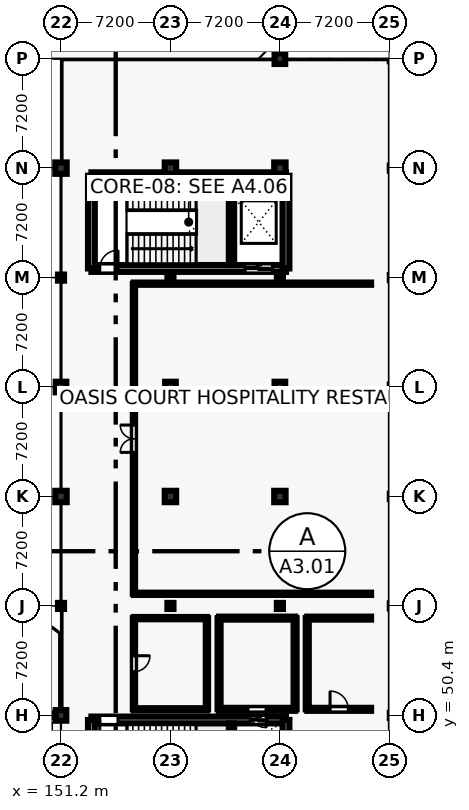
"""IFC4 building model, lengths in metres.
Left out: names, types, materials, properties, quantities, classifications, styles, units other than length and angle.
Written with IfcOpenShell. Run it as: python <this file> out.ifc"""

import sys

from ifc_helpers import new_model, si_unit, direction, frame, frame_2d, origin, origin_2d, place, context, subcontext, project, spatial, rectangle, hollow_rectangle, extrude, element, fill, save


model = new_model("IFC4")
c1 = context("Model", 3, precision=1e-05, world=origin(), true_north=direction((0.0, 1.0)))
c2 = subcontext(c1, "Body", "Model", "MODEL_VIEW")
j1 = project(units=[si_unit("LENGTHUNIT", "METRE"), si_unit("PLANEANGLEUNIT", "RADIAN")], contexts=[c1])
p1 = place(None, origin())
s1 = spatial("IfcSite", under=j1, at=p1, CompositionType="ELEMENT")
p2 = place(p1, origin())
s2 = spatial("IfcBuilding", under=s1, at=p2, CompositionType="ELEMENT")
p3 = place(p2, frame((0.0, 0.0, 9.6)))
s3 = spatial("IfcBuildingStorey", under=s2, at=p3, CompositionType="ELEMENT", Elevation=9.6)
p4 = place(p3, frame((151.2, 50.4, 0.0), z_axis=(0.0, 0.0, 1.0), x_axis=(1.0, 0.0, 0.0)))
e1 = element("IfcColumn", 1, at=p4, inside=s3, PredefinedType="COLUMN", context=c2, shape_type="SweptSolid", body=[
    extrude(rectangle(XDim=0.7, YDim=0.7, at=origin_2d()), origin(), (0.0, 0.0, 1.0), 4.2),
])
p5 = place(p3, frame((151.2, 57.6, 0.0), z_axis=(0.0, 0.0, 1.0), x_axis=(1.0, 0.0, 0.0)))
e2 = element("IfcColumn", 2, at=p5, inside=s3, PredefinedType="COLUMN", context=c2, shape_type="SweptSolid", body=[
    extrude(hollow_rectangle(XDim=0.4, YDim=0.4, WallThickness=0.02, at=origin_2d()), origin(), (0.0, 0.0, 1.0), 4.2),
])
p6 = place(p3, frame((151.2, 64.8, 0.0), z_axis=(0.0, 0.0, 1.0), x_axis=(1.0, 0.0, 0.0)))
e3 = element("IfcColumn", 3, at=p6, inside=s3, PredefinedType="COLUMN", context=c2, shape_type="SweptSolid", body=[
    extrude(rectangle(XDim=0.75, YDim=0.75, at=origin_2d()), origin(), (0.0, 0.0, 1.0), 4.2),
])
p7 = place(p3, frame((151.2, 72.0, 0.0), z_axis=(0.0, 0.0, 1.0), x_axis=(1.0, 0.0, 0.0)))
e4 = element("IfcColumn", 4, at=p7, inside=s3, PredefinedType="COLUMN", context=c2, shape_type="SweptSolid", body=[
    extrude(rectangle(XDim=0.7, YDim=0.7, at=origin_2d()), origin(), (0.0, 0.0, 1.0), 4.2),
])
p8 = place(p3, frame((151.2, 79.2, 0.0), z_axis=(0.0, 0.0, 1.0), x_axis=(1.0, 0.0, 0.0)))
e5 = element("IfcColumn", 5, at=p8, inside=s3, PredefinedType="COLUMN", context=c2, shape_type="SweptSolid", body=[
    extrude(hollow_rectangle(XDim=0.4, YDim=0.4, WallThickness=0.02, at=origin_2d()), origin(), (0.0, 0.0, 1.0), 4.2),
])
p9 = place(p3, frame((151.2, 86.4, 0.0), z_axis=(0.0, 0.0, 1.0), x_axis=(1.0, 0.0, 0.0)))
e6 = element("IfcColumn", 6, at=p9, inside=s3, PredefinedType="COLUMN", context=c2, shape_type="SweptSolid", body=[
    extrude(rectangle(XDim=0.75, YDim=0.75, at=origin_2d()), origin(), (0.0, 0.0, 1.0), 4.2),
])
p10 = place(p3, frame((158.4, 57.6, 0.0), z_axis=(0.0, 0.0, 1.0), x_axis=(1.0, 0.0, 0.0)))
e7 = element("IfcColumn", 7, at=p10, inside=s3, PredefinedType="COLUMN", context=c2, shape_type="SweptSolid", body=[
    extrude(hollow_rectangle(XDim=0.4, YDim=0.4, WallThickness=0.02, at=origin_2d()), origin(), (0.0, 0.0, 1.0), 4.2),
])
p11 = place(p3, frame((158.4, 64.8, 0.0), z_axis=(0.0, 0.0, 1.0), x_axis=(1.0, 0.0, 0.0)))
e8 = element("IfcColumn", 8, at=p11, inside=s3, PredefinedType="COLUMN", context=c2, shape_type="SweptSolid", body=[
    extrude(rectangle(XDim=0.75, YDim=0.75, at=origin_2d()), origin(), (0.0, 0.0, 1.0), 4.2),
])
p12 = place(p3, frame((158.4, 72.0, 0.0), z_axis=(0.0, 0.0, 1.0), x_axis=(1.0, 0.0, 0.0)))
e9 = element("IfcColumn", 9, at=p12, inside=s3, PredefinedType="COLUMN", context=c2, shape_type="SweptSolid", body=[
    extrude(rectangle(XDim=0.7, YDim=0.7, at=origin_2d()), origin(), (0.0, 0.0, 1.0), 4.2),
])
p13 = place(p3, frame((158.4, 79.2, 0.0), z_axis=(0.0, 0.0, 1.0), x_axis=(1.0, 0.0, 0.0)))
e10 = element("IfcColumn", 10, at=p13, inside=s3, PredefinedType="COLUMN", context=c2, shape_type="SweptSolid", body=[
    extrude(hollow_rectangle(XDim=0.4, YDim=0.4, WallThickness=0.02, at=origin_2d()), origin(), (0.0, 0.0, 1.0), 4.2),
])
p14 = place(p3, frame((158.4, 86.4, 0.0), z_axis=(0.0, 0.0, 1.0), x_axis=(1.0, 0.0, 0.0)))
e11 = element("IfcColumn", 11, at=p14, inside=s3, PredefinedType="COLUMN", context=c2, shape_type="SweptSolid", body=[
    extrude(rectangle(XDim=0.75, YDim=0.75, at=origin_2d()), origin(), (0.0, 0.0, 1.0), 4.2),
])
p15 = place(p3, frame((165.6, 57.6, 0.0), z_axis=(0.0, 0.0, 1.0), x_axis=(1.0, 0.0, 0.0)))
e12 = element("IfcColumn", 12, at=p15, inside=s3, PredefinedType="COLUMN", context=c2, shape_type="SweptSolid", body=[
    extrude(hollow_rectangle(XDim=0.4, YDim=0.4, WallThickness=0.02, at=origin_2d()), origin(), (0.0, 0.0, 1.0), 4.2),
])
p16 = place(p3, frame((165.6, 64.8, 0.0), z_axis=(0.0, 0.0, 1.0), x_axis=(1.0, 0.0, 0.0)))
e13 = element("IfcColumn", 13, at=p16, inside=s3, PredefinedType="COLUMN", context=c2, shape_type="SweptSolid", body=[
    extrude(rectangle(XDim=0.75, YDim=0.75, at=origin_2d()), origin(), (0.0, 0.0, 1.0), 4.2),
])
p17 = place(p3, frame((165.6, 72.0, 0.0), z_axis=(0.0, 0.0, 1.0), x_axis=(1.0, 0.0, 0.0)))
e14 = element("IfcColumn", 14, at=p17, inside=s3, PredefinedType="COLUMN", context=c2, shape_type="SweptSolid", body=[
    extrude(rectangle(XDim=0.7, YDim=0.7, at=origin_2d()), origin(), (0.0, 0.0, 1.0), 4.2),
])
p18 = place(p3, frame((165.6, 79.2, 0.0), z_axis=(0.0, 0.0, 1.0), x_axis=(1.0, 0.0, 0.0)))
e15 = element("IfcColumn", 15, at=p18, inside=s3, PredefinedType="COLUMN", context=c2, shape_type="SweptSolid", body=[
    extrude(hollow_rectangle(XDim=0.4, YDim=0.4, WallThickness=0.02, at=origin_2d()), origin(), (0.0, 0.0, 1.0), 4.2),
])
p19 = place(p3, frame((165.6, 86.4, 0.0), z_axis=(0.0, 0.0, 1.0), x_axis=(1.0, 0.0, 0.0)))
e16 = element("IfcColumn", 16, at=p19, inside=s3, PredefinedType="COLUMN", context=c2, shape_type="SweptSolid", body=[
    extrude(rectangle(XDim=0.75, YDim=0.75, at=origin_2d()), origin(), (0.0, 0.0, 1.0), 4.2),
])
p20 = place(p3, frame((165.6, 93.6, 0.0), z_axis=(0.0, 0.0, 1.0), x_axis=(1.0, 0.0, 0.0)))
e17 = element("IfcColumn", 17, at=p20, inside=s3, PredefinedType="COLUMN", context=c2, shape_type="SweptSolid", body=[
    extrude(rectangle(XDim=0.7, YDim=0.7, at=origin_2d()), origin(), (0.0, 0.0, 1.0), 4.2),
])
p21 = place(p3, frame((153.2, 50.1, 0.0), z_axis=(0.0, 0.0, 1.0), x_axis=(1.0, 0.0, 0.0)))
e18 = element("IfcWall", 18, at=p21, inside=s3, PredefinedType="SHEAR", context=c2, shape_type="SweptSolid", body=[
    extrude(rectangle(XDim=12.8, YDim=0.45, at=frame_2d((6.4, 0.0))), origin(), (0.0, 0.0, 1.0), 3.88),
])
p22 = place(p21, frame((0.55, 0.0, 0.0)))
e19 = element("IfcOpeningElement", 19, at=p22, cuts=e18, PredefinedType="OPENING", context=c2, shape_type="SweptSolid", body=[
    extrude(rectangle(XDim=1.2, YDim=2.25, at=frame_2d((0.6, 1.125))), frame((0.0, 0.235, 0.0), z_axis=(0.0, -1.0, 0.0), x_axis=(1.0, 0.0, 0.0)), (0.0, 0.0, 1.0), 0.47),
])
p23 = place(p21, frame((10.458, 0.0, 0.0)))
e20 = element("IfcOpeningElement", 20, at=p23, cuts=e18, PredefinedType="OPENING", context=c2, shape_type="SweptSolid", body=[
    extrude(rectangle(XDim=1.1, YDim=2.2, at=frame_2d((0.55, 1.1))), frame((0.0, 0.235, 0.0), z_axis=(0.0, -1.0, 0.0), x_axis=(1.0, 0.0, 0.0)), (0.0, 0.0, 1.0), 0.47),
])
for number, where, z_axis, x_axis in (
    (21, (153.2, 44.0, 0.0), (0.0, 0.0, 1.0), (0.0, 1.0, 0.0)),
    (22, (166.0, 44.0, 0.0), (0.0, 0.0, 1.0), (0.0, 1.0, 0.0)),
):
    element("IfcWall", number, at=place(p3, frame(where, z_axis=z_axis, x_axis=x_axis)), inside=s3, PredefinedType="SHEAR", context=c2, shape_type="SweptSolid", body=[
        extrude(rectangle(XDim=6.1, YDim=0.45, at=frame_2d((3.05, 0.0))), origin(), (0.0, 0.0, 1.0), 3.88),
    ])
p24 = place(p3, frame((162.416, 44.225, 0.0), z_axis=(0.0, 0.0, 1.0), x_axis=(0.0, 1.0, 0.0)))
e23 = element("IfcWall", 23, at=p24, inside=s3, PredefinedType="SHEAR", context=c2, shape_type="SweptSolid", body=[
    extrude(rectangle(XDim=5.65, YDim=0.35, at=frame_2d((2.825, 0.0))), origin(), (0.0, 0.0, 1.0), 3.88),
])
p25 = place(p3, frame((153.2, 79.8, 0.0), z_axis=(0.0, 0.0, 1.0), x_axis=(1.0, 0.0, 0.0)))
e24 = element("IfcWall", 24, at=p25, inside=s3, PredefinedType="SHEAR", context=c2, shape_type="SweptSolid", body=[
    extrude(rectangle(XDim=12.8, YDim=0.45, at=frame_2d((6.4, 0.0))), origin(), (0.0, 0.0, 1.0), 3.88),
])
p26 = place(p25, frame((0.55, 0.0, 0.0)))
e25 = element("IfcOpeningElement", 25, at=p26, cuts=e24, PredefinedType="OPENING", context=c2, shape_type="SweptSolid", body=[
    extrude(rectangle(XDim=1.2, YDim=2.25, at=frame_2d((0.6, 1.125))), frame((0.0, 0.235, 0.0), z_axis=(0.0, -1.0, 0.0), x_axis=(1.0, 0.0, 0.0)), (0.0, 0.0, 1.0), 0.47),
])
p27 = place(p25, frame((10.108, 0.0, 0.0)))
e26 = element("IfcOpeningElement", 26, at=p27, cuts=e24, PredefinedType="OPENING", context=c2, shape_type="SweptSolid", body=[
    extrude(rectangle(XDim=1.8, YDim=2.4, at=frame_2d((0.9, 1.2))), frame((0.0, 0.235, 0.0), z_axis=(0.0, -1.0, 0.0), x_axis=(1.0, 0.0, 0.0)), (0.0, 0.0, 1.0), 0.47),
])
p28 = place(p3, frame((153.2, 85.9, 0.0), z_axis=(0.0, 0.0, 1.0), x_axis=(1.0, 0.0, 0.0)))
e27 = element("IfcWall", 27, at=p28, inside=s3, PredefinedType="SHEAR", context=c2, shape_type="SweptSolid", body=[
    extrude(rectangle(XDim=12.8, YDim=0.45, at=frame_2d((6.4, 0.0))), origin(), (0.0, 0.0, 1.0), 3.88),
])
for number, where, z_axis, x_axis in (
    (28, (153.2, 79.8, 0.0), (0.0, 0.0, 1.0), (0.0, 1.0, 0.0)),
    (29, (166.0, 79.8, 0.0), (0.0, 0.0, 1.0), (0.0, 1.0, 0.0)),
):
    element("IfcWall", number, at=place(p3, frame(where, z_axis=z_axis, x_axis=x_axis)), inside=s3, PredefinedType="SHEAR", context=c2, shape_type="SweptSolid", body=[
        extrude(rectangle(XDim=6.1, YDim=0.45, at=frame_2d((3.05, 0.0))), origin(), (0.0, 0.0, 1.0), 3.88),
    ])
p29 = place(p3, frame((162.416, 80.025, 0.0), z_axis=(0.0, 0.0, 1.0), x_axis=(0.0, 1.0, 0.0)))
e30 = element("IfcWall", 30, at=p29, inside=s3, PredefinedType="SHEAR", context=c2, shape_type="SweptSolid", body=[
    extrude(rectangle(XDim=5.65, YDim=0.35, at=frame_2d((2.825, 0.0))), origin(), (0.0, 0.0, 1.0), 3.88),
])
p30 = place(p3, frame((144.35, 50.4, 0.0), z_axis=(0.0, 0.0, 1.0), x_axis=(1.0, 0.0, 0.0)))
e31 = element("IfcWall", 31, at=p30, inside=s3, PredefinedType="SOLIDWALL", context=c2, shape_type="SweptSolid", body=[
    extrude(rectangle(XDim=6.5, YDim=0.26, at=frame_2d((3.25, 0.0))), origin(), (0.0, 0.0, 1.0), 2.94),
])
p31 = place(p30, frame((2.35, 0.0, 0.0)))
e32 = element("IfcOpeningElement", 32, at=p31, cuts=e31, PredefinedType="OPENING", context=c2, shape_type="SweptSolid", body=[
    extrude(rectangle(XDim=1.8, YDim=2.35, at=frame_2d((0.9, 1.175))), frame((0.0, 0.14, 0.0), z_axis=(0.0, -1.0, 0.0), x_axis=(1.0, 0.0, 0.0)), (0.0, 0.0, 1.0), 0.28),
])
p32 = place(p3, frame((165.45, 93.6, 1.8), z_axis=(0.0, 0.0, 1.0), x_axis=(0.0, 1.0, 0.0)))
e33 = element("IfcWall", 33, at=p32, inside=s3, PredefinedType="PARAPET", context=c2, shape_type="SweptSolid", body=[
    extrude(rectangle(XDim=28.65, YDim=0.18, at=frame_2d((14.325, 0.0))), origin(), (0.0, 0.0, 1.0), 1.15),
])
for number, where, z_axis, x_axis in (
    (34, (156.0, 58.4, 0.0), (0.0, 0.0, 1.0), (1.0, 0.0, 0.0)),
    (35, (171.6, 78.8, 0.0), (0.0, 0.0, 1.0), (-1.0, 0.0, 0.0)),
):
    element("IfcWall", number, at=place(p3, frame(where, z_axis=z_axis, x_axis=x_axis)), inside=s3, PredefinedType="PARTITIONING", context=c2, shape_type="SweptSolid", body=[
        extrude(rectangle(XDim=15.6, YDim=0.15, at=frame_2d((7.8, 0.0))), origin(), (0.0, 0.0, 1.0), 2.94),
    ])
p33 = place(p3, frame((156.0, 78.8, 0.0), z_axis=(0.0, 0.0, 1.0), x_axis=(0.0, -1.0, 0.0)))
e36 = element("IfcWall", 36, at=p33, inside=s3, PredefinedType="PARTITIONING", context=c2, shape_type="SweptSolid", body=[
    extrude(rectangle(XDim=20.4, YDim=0.15, at=frame_2d((10.2, 0.0))), origin(), (0.0, 0.0, 1.0), 2.94),
])
p34 = place(p33, frame((9.3, 0.0, 0.0)))
e37 = element("IfcOpeningElement", 37, at=p34, cuts=e36, PredefinedType="OPENING", context=c2, shape_type="SweptSolid", body=[
    extrude(rectangle(XDim=1.8, YDim=2.3, at=frame_2d((0.9, 1.15))), frame((0.0, 0.085, 0.0), z_axis=(0.0, -1.0, 0.0), x_axis=(1.0, 0.0, 0.0)), (0.0, 0.0, 1.0), 0.17),
])
p35 = place(p3, frame((156.0, 50.8, 0.0), z_axis=(0.0, 0.0, 1.0), x_axis=(1.0, 0.0, 0.0)))
e38 = element("IfcWall", 38, at=p35, inside=s3, PredefinedType="PARTITIONING", context=c2, shape_type="SweptSolid", body=[
    extrude(rectangle(XDim=4.8, YDim=0.15, at=frame_2d((2.4, 0.0))), origin(), (0.0, 0.0, 1.0), 2.94),
])
p36 = place(p3, frame((160.8, 50.8, 0.0), z_axis=(0.0, 0.0, 1.0), x_axis=(0.0, 1.0, 0.0)))
e39 = element("IfcWall", 39, at=p36, inside=s3, PredefinedType="PARTITIONING", context=c2, shape_type="SweptSolid", body=[
    extrude(rectangle(XDim=6.0, YDim=0.15, at=frame_2d((3.0, 0.0))), origin(), (0.0, 0.0, 1.0), 2.94),
])
p37 = place(p3, frame((160.8, 56.8, 0.0), z_axis=(0.0, 0.0, 1.0), x_axis=(-1.0, 0.0, 0.0)))
e40 = element("IfcWall", 40, at=p37, inside=s3, PredefinedType="PARTITIONING", context=c2, shape_type="SweptSolid", body=[
    extrude(rectangle(XDim=4.8, YDim=0.15, at=frame_2d((2.4, 0.0))), origin(), (0.0, 0.0, 1.0), 2.94),
])
p38 = place(p3, frame((156.0, 56.8, 0.0), z_axis=(0.0, 0.0, 1.0), x_axis=(0.0, -1.0, 0.0)))
e41 = element("IfcWall", 41, at=p38, inside=s3, PredefinedType="PARTITIONING", context=c2, shape_type="SweptSolid", body=[
    extrude(rectangle(XDim=6.0, YDim=0.15, at=frame_2d((3.0, 0.0))), origin(), (0.0, 0.0, 1.0), 2.94),
])
p39 = place(p38, frame((2.475, 0.0, 0.0)))
e42 = element("IfcOpeningElement", 42, at=p39, cuts=e41, PredefinedType="OPENING", context=c2, shape_type="SweptSolid", body=[
    extrude(rectangle(XDim=1.05, YDim=2.2, at=frame_2d((0.525, 1.1))), frame((0.0, 0.085, 0.0), z_axis=(0.0, -1.0, 0.0), x_axis=(1.0, 0.0, 0.0)), (0.0, 0.0, 1.0), 0.17),
])
p40 = place(p3, frame((161.6, 50.8, 0.0), z_axis=(0.0, 0.0, 1.0), x_axis=(1.0, 0.0, 0.0)))
e43 = element("IfcWall", 43, at=p40, inside=s3, PredefinedType="PARTITIONING", context=c2, shape_type="SweptSolid", body=[
    extrude(rectangle(XDim=5.0, YDim=0.2, at=frame_2d((2.5, 0.0))), origin(), (0.0, 0.0, 1.0), 2.94),
])
p41 = place(p40, frame((1.9, 0.0, 0.0)))
e44 = element("IfcOpeningElement", 44, at=p41, cuts=e43, PredefinedType="OPENING", context=c2, shape_type="SweptSolid", body=[
    extrude(rectangle(XDim=1.2, YDim=2.25, at=frame_2d((0.6, 1.125))), frame((0.0, 0.11, 0.0), z_axis=(0.0, -1.0, 0.0), x_axis=(1.0, 0.0, 0.0)), (0.0, 0.0, 1.0), 0.22),
])
p42 = place(p3, frame((166.6, 50.8, 0.0), z_axis=(0.0, 0.0, 1.0), x_axis=(0.0, 1.0, 0.0)))
e45 = element("IfcWall", 45, at=p42, inside=s3, PredefinedType="PARTITIONING", context=c2, shape_type="SweptSolid", body=[
    extrude(rectangle(XDim=6.0, YDim=0.2, at=frame_2d((3.0, 0.0))), origin(), (0.0, 0.0, 1.0), 2.94),
])
p43 = place(p3, frame((166.6, 56.8, 0.0), z_axis=(0.0, 0.0, 1.0), x_axis=(-1.0, 0.0, 0.0)))
e46 = element("IfcWall", 46, at=p43, inside=s3, PredefinedType="PARTITIONING", context=c2, shape_type="SweptSolid", body=[
    extrude(rectangle(XDim=5.0, YDim=0.2, at=frame_2d((2.5, 0.0))), origin(), (0.0, 0.0, 1.0), 2.94),
])
p44 = place(p3, frame((161.6, 56.8, 0.0), z_axis=(0.0, 0.0, 1.0), x_axis=(0.0, -1.0, 0.0)))
e47 = element("IfcWall", 47, at=p44, inside=s3, PredefinedType="PARTITIONING", context=c2, shape_type="SweptSolid", body=[
    extrude(rectangle(XDim=6.0, YDim=0.2, at=frame_2d((3.0, 0.0))), origin(), (0.0, 0.0, 1.0), 2.94),
])
p45 = place(p3, frame((167.4, 50.8, 0.0), z_axis=(0.0, 0.0, 1.0), x_axis=(1.0, 0.0, 0.0)))
e48 = element("IfcWall", 48, at=p45, inside=s3, PredefinedType="PARTITIONING", context=c2, shape_type="SweptSolid", body=[
    extrude(rectangle(XDim=4.2, YDim=0.2, at=frame_2d((2.1, 0.0))), origin(), (0.0, 0.0, 1.0), 2.94),
])
p46 = place(p45, frame((1.5, 0.0, 0.0)))
e49 = element("IfcOpeningElement", 49, at=p46, cuts=e48, PredefinedType="OPENING", context=c2, shape_type="SweptSolid", body=[
    extrude(rectangle(XDim=1.2, YDim=2.25, at=frame_2d((0.6, 1.125))), frame((0.0, 0.11, 0.0), z_axis=(0.0, -1.0, 0.0), x_axis=(1.0, 0.0, 0.0)), (0.0, 0.0, 1.0), 0.22),
])
p47 = place(p3, frame((171.6, 56.8, 0.0), z_axis=(0.0, 0.0, 1.0), x_axis=(-1.0, 0.0, 0.0)))
e50 = element("IfcWall", 50, at=p47, inside=s3, PredefinedType="PARTITIONING", context=c2, shape_type="SweptSolid", body=[
    extrude(rectangle(XDim=4.2, YDim=0.2, at=frame_2d((2.1, 0.0))), origin(), (0.0, 0.0, 1.0), 2.94),
])
p48 = place(p3, frame((167.4, 56.8, 0.0), z_axis=(0.0, 0.0, 1.0), x_axis=(0.0, -1.0, 0.0)))
e51 = element("IfcWall", 51, at=p48, inside=s3, PredefinedType="PARTITIONING", context=c2, shape_type="SweptSolid", body=[
    extrude(rectangle(XDim=6.0, YDim=0.2, at=frame_2d((3.0, 0.0))), origin(), (0.0, 0.0, 1.0), 2.94),
])
p49 = place(p22, frame((1.2, 0.0, 0.0), z_axis=(0.0, 0.0, 1.0), x_axis=(-1.0, 0.0, 0.0)))
e52 = element("IfcDoor", 52, at=p49, inside=s3, OperationType="SINGLE_SWING_LEFT", PredefinedType="DOOR", context=c2, shape_type="SweptSolid", body=[
    extrude(rectangle(XDim=1.2, YDim=2.25, at=frame_2d((0.6, 1.125))), frame((0.0, 0.025, 0.0), z_axis=(0.0, -1.0, 0.0), x_axis=(1.0, 0.0, 0.0)), (0.0, 0.0, 1.0), 0.05),
])
fill(e19, e52)
p50 = place(p23, origin())
e53 = element("IfcDoor", 53, at=p50, inside=s3, OperationType="SLIDING_TO_RIGHT", PredefinedType="DOOR", context=c2, shape_type="SweptSolid", body=[
    extrude(rectangle(XDim=1.1, YDim=2.2, at=frame_2d((0.55, 1.1))), frame((0.0, 0.025, 0.0), z_axis=(0.0, -1.0, 0.0), x_axis=(1.0, 0.0, 0.0)), (0.0, 0.0, 1.0), 0.05),
])
fill(e20, e53)
p51 = place(p26, origin())
e54 = element("IfcDoor", 54, at=p51, inside=s3, OperationType="SINGLE_SWING_RIGHT", PredefinedType="DOOR", context=c2, shape_type="SweptSolid", body=[
    extrude(rectangle(XDim=1.2, YDim=2.25, at=frame_2d((0.6, 1.125))), frame((0.0, 0.025, 0.0), z_axis=(0.0, -1.0, 0.0), x_axis=(1.0, 0.0, 0.0)), (0.0, 0.0, 1.0), 0.05),
])
fill(e25, e54)
p52 = place(p27, origin())
e55 = element("IfcDoor", 55, at=p52, inside=s3, OperationType="SLIDING_TO_RIGHT", PredefinedType="DOOR", context=c2, shape_type="SweptSolid", body=[
    extrude(rectangle(XDim=1.8, YDim=2.4, at=frame_2d((0.9, 1.2))), frame((0.0, 0.025, 0.0), z_axis=(0.0, -1.0, 0.0), x_axis=(1.0, 0.0, 0.0)), (0.0, 0.0, 1.0), 0.05),
])
fill(e26, e55)
p53 = place(p34, frame((1.8, 0.0, 0.0), z_axis=(0.0, 0.0, 1.0), x_axis=(-1.0, 0.0, 0.0)))
e56 = element("IfcDoor", 56, at=p53, inside=s3, OperationType="DOUBLE_DOOR_SINGLE_SWING", PredefinedType="DOOR", context=c2, shape_type="SweptSolid", body=[
    extrude(rectangle(XDim=1.8, YDim=2.3, at=frame_2d((0.9, 1.15))), frame((0.0, 0.025, 0.0), z_axis=(0.0, -1.0, 0.0), x_axis=(1.0, 0.0, 0.0)), (0.0, 0.0, 1.0), 0.05),
])
fill(e37, e56)
p54 = place(p39, origin())
e57 = element("IfcDoor", 57, at=p54, inside=s3, OperationType="SINGLE_SWING_LEFT", PredefinedType="DOOR", context=c2, shape_type="SweptSolid", body=[
    extrude(rectangle(XDim=1.05, YDim=2.2, at=frame_2d((0.525, 1.1))), frame((0.0, 0.025, 0.0), z_axis=(0.0, -1.0, 0.0), x_axis=(1.0, 0.0, 0.0)), (0.0, 0.0, 1.0), 0.05),
])
fill(e42, e57)
p55 = place(p41, frame((1.2, 0.0, 0.0), z_axis=(0.0, 0.0, 1.0), x_axis=(-1.0, 0.0, 0.0)))
e58 = element("IfcDoor", 58, at=p55, inside=s3, OperationType="SINGLE_SWING_RIGHT", PredefinedType="DOOR", context=c2, shape_type="SweptSolid", body=[
    extrude(rectangle(XDim=1.2, YDim=2.25, at=frame_2d((0.6, 1.125))), frame((0.0, 0.025, 0.0), z_axis=(0.0, -1.0, 0.0), x_axis=(1.0, 0.0, 0.0)), (0.0, 0.0, 1.0), 0.05),
])
fill(e44, e58)
p56 = place(p46, origin())
e59 = element("IfcDoor", 59, at=p56, inside=s3, OperationType="SINGLE_SWING_LEFT", PredefinedType="DOOR", context=c2, shape_type="SweptSolid", body=[
    extrude(rectangle(XDim=1.2, YDim=2.25, at=frame_2d((0.6, 1.125))), frame((0.0, 0.025, 0.0), z_axis=(0.0, -1.0, 0.0), x_axis=(1.0, 0.0, 0.0)), (0.0, 0.0, 1.0), 0.05),
])
fill(e49, e59)
save(model, sys.argv[1])
